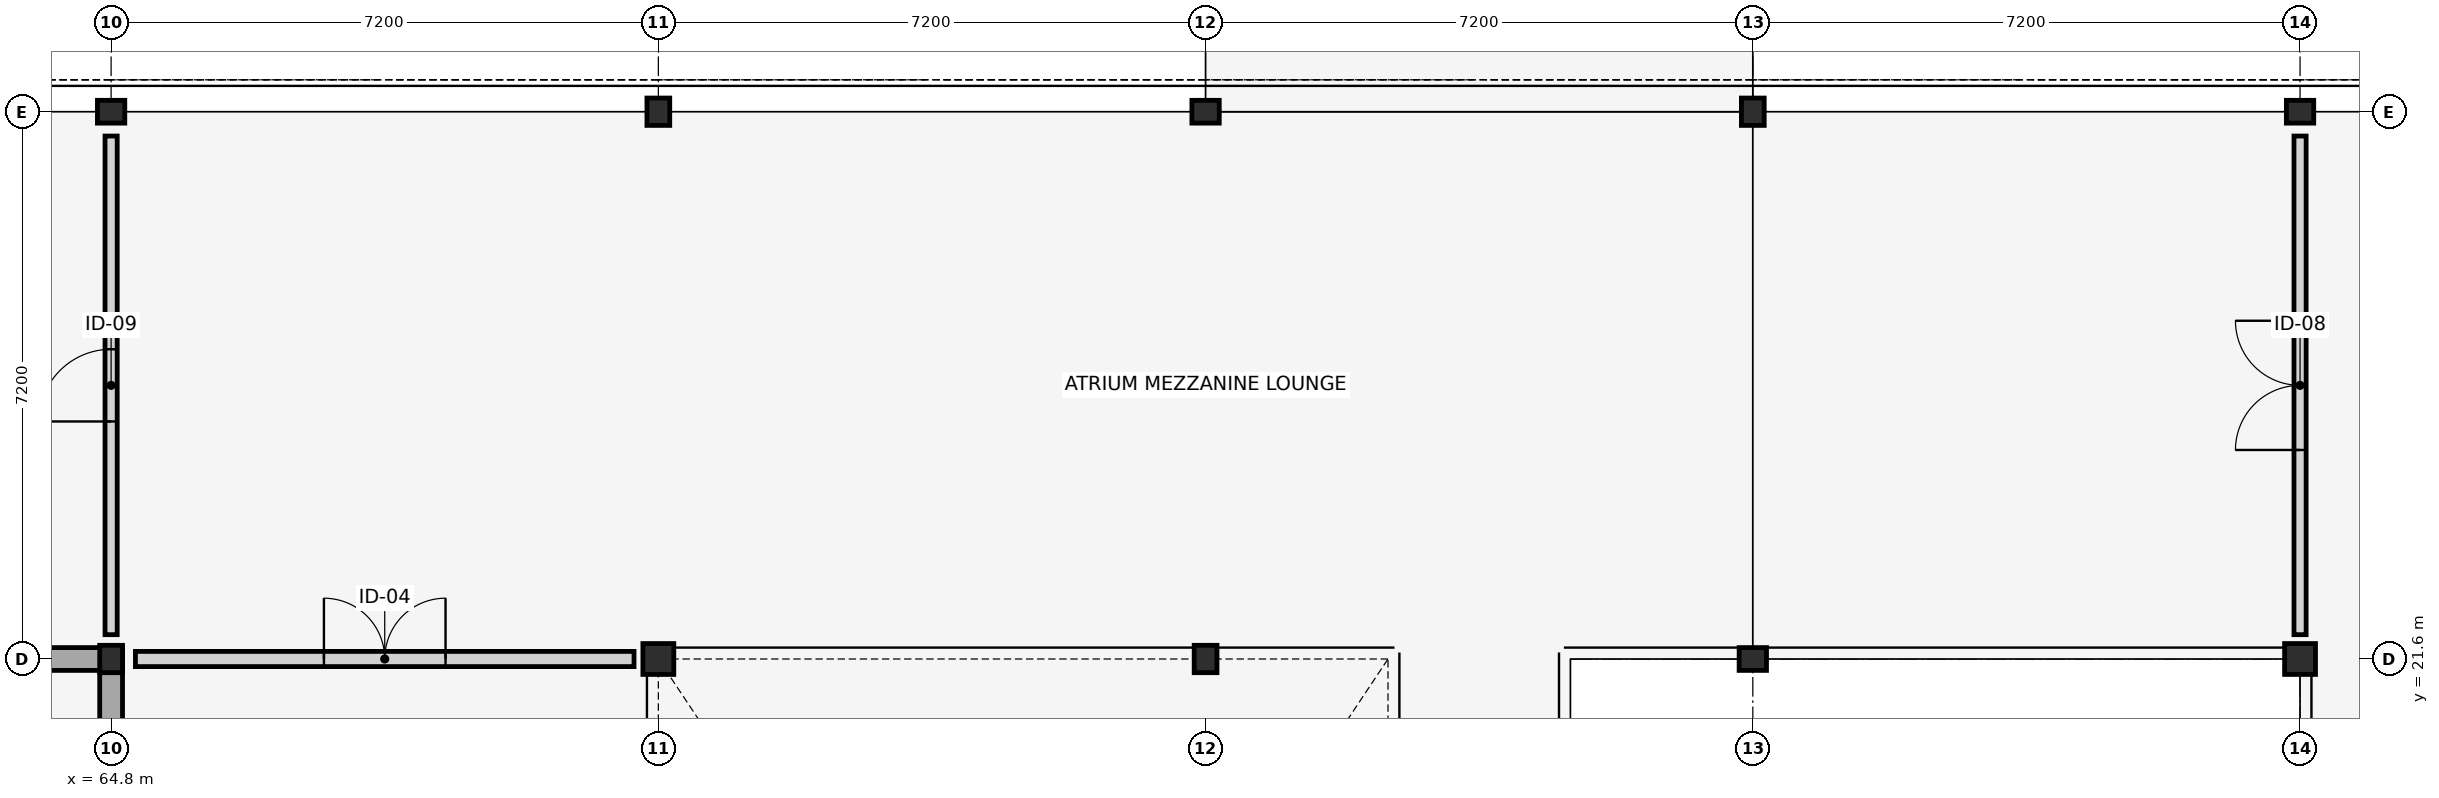
"""IFC4 building model, lengths in metres.
Left out: names, types, materials, properties, quantities, classifications, styles, units other than length and angle.
Written with IfcOpenShell. Run it as: python <this file> out.ifc"""

import sys

from ifc_helpers import new_model, si_unit, direction, frame, frame_2d, origin, origin_2d, place, context, subcontext, project, spatial, rectangle, hollow_circle, i_section, extrude, element, fill, save


model = new_model("IFC4")
c1 = context("Model", 3, precision=1e-05, world=origin(), true_north=direction((0.0, 1.0)))
c2 = subcontext(c1, "Body", "Model", "MODEL_VIEW")
j1 = project(units=[si_unit("LENGTHUNIT", "METRE"), si_unit("PLANEANGLEUNIT", "RADIAN")], contexts=[c1])
p1 = place(None, origin())
s1 = spatial("IfcSite", under=j1, at=p1, CompositionType="ELEMENT")
p2 = place(p1, origin())
s2 = spatial("IfcBuilding", under=s1, at=p2, CompositionType="ELEMENT")
p3 = place(p2, frame((0.0, 0.0, 8.7)))
s3 = spatial("IfcBuildingStorey", under=s2, at=p3, CompositionType="ELEMENT", Elevation=8.7)
for number, where, z_axis, x_axis in (
    (1, (64.8, 21.6, 0.0), (0.0, 0.0, 1.0), (1.0, 0.0, 0.0)),
    (2, (64.8, 28.8, 0.0), (0.0, 0.0, 1.0), (0.0, 1.0, 0.0)),
):
    element("IfcColumn", number, at=place(p3, frame(where, z_axis=z_axis, x_axis=x_axis)), inside=s3, PredefinedType="COLUMN", context=c2, shape_type="SweptSolid", body=[
        extrude(i_section(OverallWidth=0.3, OverallDepth=0.36, WebThickness=0.012, FlangeThickness=0.022, FilletRadius=0.027, at=origin_2d()), origin(), (0.0, 0.0, 1.0), 4.2),
    ])
p4 = place(p3, frame((72.0, 21.6, 0.0), z_axis=(0.0, 0.0, 1.0), x_axis=(0.0, 1.0, 0.0)))
e3 = element("IfcColumn", 3, at=p4, inside=s3, PredefinedType="COLUMN", context=c2, shape_type="SweptSolid", body=[
    extrude(hollow_circle(Radius=0.203, WallThickness=0.016, at=origin_2d()), origin(), (0.0, 0.0, 1.0), 4.2),
])
for number, where, z_axis, x_axis in (
    (4, (72.0, 28.8, 0.0), (0.0, 0.0, 1.0), (1.0, 0.0, 0.0)),
    (5, (79.2, 21.6, 0.0), (0.0, 0.0, 1.0), (1.0, 0.0, 0.0)),
    (6, (79.2, 28.8, 0.0), (0.0, 0.0, 1.0), (0.0, 1.0, 0.0)),
    (7, (86.4, 21.6, 0.0), (0.0, 0.0, 1.0), (0.0, 1.0, 0.0)),
    (8, (86.4, 28.8, 0.0), (0.0, 0.0, 1.0), (1.0, 0.0, 0.0)),
):
    element("IfcColumn", number, at=place(p3, frame(where, z_axis=z_axis, x_axis=x_axis)), inside=s3, PredefinedType="COLUMN", context=c2, shape_type="SweptSolid", body=[
        extrude(i_section(OverallWidth=0.3, OverallDepth=0.36, WebThickness=0.012, FlangeThickness=0.022, FilletRadius=0.027, at=origin_2d()), origin(), (0.0, 0.0, 1.0), 4.2),
    ])
p5 = place(p3, frame((93.6, 21.6, 0.0), z_axis=(0.0, 0.0, 1.0), x_axis=(1.0, 0.0, 0.0)))
e9 = element("IfcColumn", 9, at=p5, inside=s3, PredefinedType="COLUMN", context=c2, shape_type="SweptSolid", body=[
    extrude(hollow_circle(Radius=0.203, WallThickness=0.016, at=origin_2d()), origin(), (0.0, 0.0, 1.0), 4.2),
])
p6 = place(p3, frame((93.6, 28.8, 0.0), z_axis=(0.0, 0.0, 1.0), x_axis=(0.0, 1.0, 0.0)))
e10 = element("IfcColumn", 10, at=p6, inside=s3, PredefinedType="COLUMN", context=c2, shape_type="SweptSolid", body=[
    extrude(i_section(OverallWidth=0.3, OverallDepth=0.36, WebThickness=0.012, FlangeThickness=0.022, FilletRadius=0.027, at=origin_2d()), origin(), (0.0, 0.0, 1.0), 4.2),
])
p7 = place(p3, frame((57.6, 21.6, 0.0), z_axis=(0.0, 0.0, 1.0), x_axis=(1.0, 0.0, 0.0)))
e11 = element("IfcWall", 11, at=p7, inside=s3, PredefinedType="SHEAR", context=c2, shape_type="SweptSolid", body=[
    extrude(rectangle(XDim=7.35, YDim=0.3, at=frame_2d((3.675, 0.0))), origin(), (0.0, 0.0, 1.0), 3.96),
])
p8 = place(p3, frame((64.8, 7.35, 0.0), z_axis=(0.0, 0.0, 1.0), x_axis=(0.0, 1.0, 0.0)))
e12 = element("IfcWall", 12, at=p8, inside=s3, PredefinedType="SHEAR", context=c2, shape_type="SweptSolid", body=[
    extrude(rectangle(XDim=14.1, YDim=0.3, at=frame_2d((7.05, 0.0))), origin(), (0.0, 0.0, 1.0), 3.96),
])
p9 = place(p8, frame((3.55, 0.0, 0.0)))
e13 = element("IfcOpeningElement", 13, at=p9, cuts=e12, PredefinedType="OPENING", context=c2, shape_type="SweptSolid", body=[
    extrude(rectangle(XDim=1.3, YDim=2.2, at=frame_2d((0.65, 1.1))), frame((0.0, 0.16, 0.0), z_axis=(0.0, -1.0, 0.0), x_axis=(1.0, 0.0, 0.0)), (0.0, 0.0, 1.0), 0.32),
])
p10 = place(p8, frame((7.85, 0.0, 0.0)))
e14 = element("IfcOpeningElement", 14, at=p10, cuts=e12, PredefinedType="OPENING", context=c2, shape_type="SweptSolid", body=[
    extrude(rectangle(XDim=1.05, YDim=2.15, at=frame_2d((0.525, 1.075))), frame((0.0, 0.16, 0.0), z_axis=(0.0, -1.0, 0.0), x_axis=(1.0, 0.0, 0.0)), (0.0, 0.0, 1.0), 0.32),
])
p11 = place(p8, frame((10.55, 0.0, 0.0)))
e15 = element("IfcOpeningElement", 15, at=p11, cuts=e12, PredefinedType="OPENING", context=c2, shape_type="SweptSolid", body=[
    extrude(rectangle(XDim=1.0, YDim=2.15, at=frame_2d((0.5, 1.075))), frame((0.0, 0.16, 0.0), z_axis=(0.0, -1.0, 0.0), x_axis=(1.0, 0.0, 0.0)), (0.0, 0.0, 1.0), 0.32),
])
p12 = place(p3, frame((65.12, 21.6, 0.0), z_axis=(0.0, 0.0, 1.0), x_axis=(1.0, 0.0, 0.0)))
e16 = element("IfcWall", 16, at=p12, inside=s3, PredefinedType="PARTITIONING", context=c2, shape_type="SweptSolid", body=[
    extrude(rectangle(XDim=6.56, YDim=0.2, at=frame_2d((3.28, 0.0))), origin(), (0.0, 0.0, 1.0), 3.15),
])
p13 = place(p12, frame((2.48, 0.0, 0.0)))
e17 = element("IfcOpeningElement", 17, at=p13, cuts=e16, PredefinedType="OPENING", context=c2, shape_type="SweptSolid", body=[
    extrude(rectangle(XDim=1.6, YDim=2.35, at=frame_2d((0.8, 1.175))), frame((0.0, 0.11, 0.0), z_axis=(0.0, -1.0, 0.0), x_axis=(1.0, 0.0, 0.0)), (0.0, 0.0, 1.0), 0.22),
])
p14 = place(p3, frame((93.6, 21.92, 0.0), z_axis=(0.0, 0.0, 1.0), x_axis=(0.0, 1.0, 0.0)))
e18 = element("IfcWall", 18, at=p14, inside=s3, PredefinedType="PARTITIONING", context=c2, shape_type="SweptSolid", body=[
    extrude(rectangle(XDim=6.56, YDim=0.16, at=frame_2d((3.28, 0.0))), origin(), (0.0, 0.0, 1.0), 3.15),
])
p15 = place(p14, frame((2.43, 0.0, 0.0)))
e19 = element("IfcOpeningElement", 19, at=p15, cuts=e18, PredefinedType="OPENING", context=c2, shape_type="SweptSolid", body=[
    extrude(rectangle(XDim=1.7, YDim=2.4, at=frame_2d((0.85, 1.2))), frame((0.0, 0.09, 0.0), z_axis=(0.0, -1.0, 0.0), x_axis=(1.0, 0.0, 0.0)), (0.0, 0.0, 1.0), 0.18),
])
p16 = place(p3, frame((64.8, 21.92, 0.0), z_axis=(0.0, 0.0, 1.0), x_axis=(0.0, 1.0, 0.0)))
e20 = element("IfcWall", 20, at=p16, inside=s3, PredefinedType="PARTITIONING", context=c2, shape_type="SweptSolid", body=[
    extrude(rectangle(XDim=6.56, YDim=0.16, at=frame_2d((3.28, 0.0))), origin(), (0.0, 0.0, 1.0), 3.15),
])
p17 = place(p16, frame((2.805, 0.0, 0.0)))
e21 = element("IfcOpeningElement", 21, at=p17, cuts=e20, PredefinedType="OPENING", context=c2, shape_type="SweptSolid", body=[
    extrude(rectangle(XDim=0.95, YDim=2.1, at=frame_2d((0.475, 1.05))), frame((0.0, 0.09, 0.0), z_axis=(0.0, -1.0, 0.0), x_axis=(1.0, 0.0, 0.0)), (0.0, 0.0, 1.0), 0.18),
])
p18 = place(p13, origin())
e22 = element("IfcDoor", 22, at=p18, inside=s3, OperationType="DOUBLE_DOOR_SINGLE_SWING", PredefinedType="DOOR", context=c2, shape_type="SweptSolid", body=[
    extrude(rectangle(XDim=1.6, YDim=2.35, at=frame_2d((0.8, 1.175))), frame((0.0, 0.025, 0.0), z_axis=(0.0, -1.0, 0.0), x_axis=(1.0, 0.0, 0.0)), (0.0, 0.0, 1.0), 0.05),
])
fill(e17, e22)
p19 = place(p15, origin())
e23 = element("IfcDoor", 23, at=p19, inside=s3, OperationType="DOUBLE_DOOR_SINGLE_SWING", PredefinedType="DOOR", context=c2, shape_type="SweptSolid", body=[
    extrude(rectangle(XDim=1.7, YDim=2.4, at=frame_2d((0.85, 1.2))), frame((0.0, 0.025, 0.0), z_axis=(0.0, -1.0, 0.0), x_axis=(1.0, 0.0, 0.0)), (0.0, 0.0, 1.0), 0.05),
])
fill(e19, e23)
p20 = place(p17, origin())
e24 = element("IfcDoor", 24, at=p20, inside=s3, OperationType="SINGLE_SWING_LEFT", PredefinedType="DOOR", context=c2, shape_type="SweptSolid", body=[
    extrude(rectangle(XDim=0.95, YDim=2.1, at=frame_2d((0.475, 1.05))), frame((0.0, 0.025, 0.0), z_axis=(0.0, -1.0, 0.0), x_axis=(1.0, 0.0, 0.0)), (0.0, 0.0, 1.0), 0.05),
])
fill(e21, e24)
save(model, sys.argv[1])
